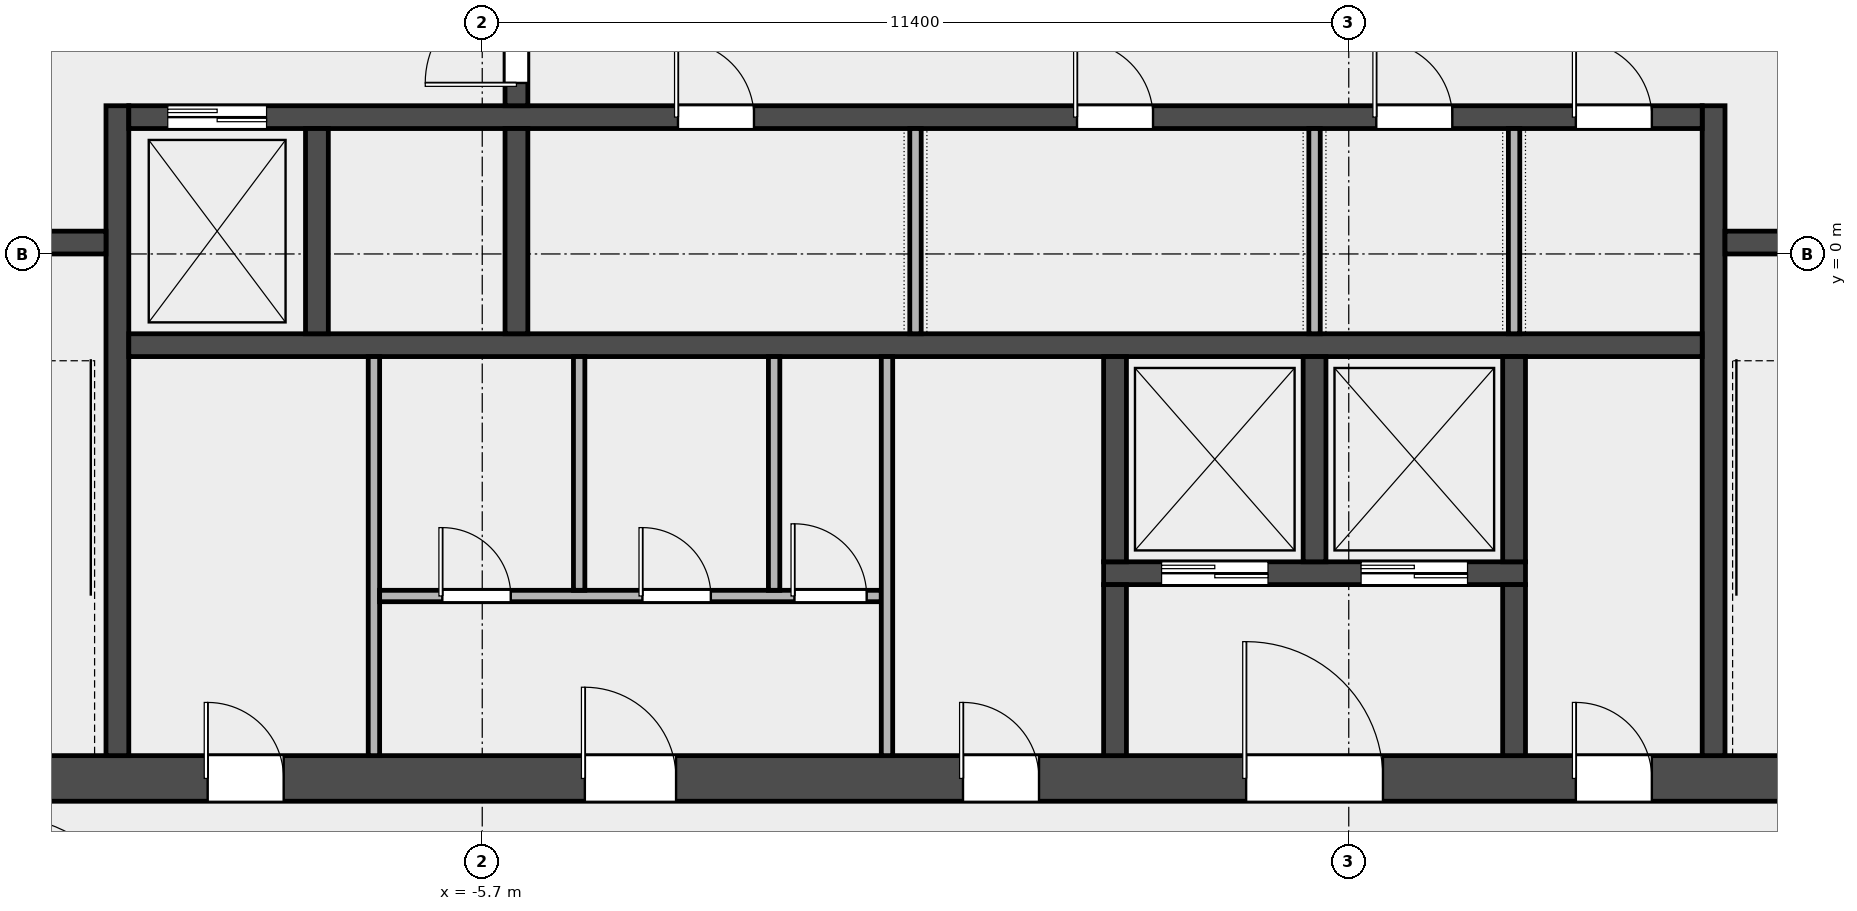
"""IFC4 building model, lengths in metres.
Left out: names, types, materials, properties, quantities, classifications, styles, units other than length and angle.
Written with IfcOpenShell. Run it as: python <this file> out.ifc"""

import sys

from ifc_helpers import new_model, si_unit, direction, frame, frame_2d, origin, place, context, subcontext, project, spatial, rectangle, extrude, element, fill, save


model = new_model("IFC4")
c1 = context("Model", 3, precision=1e-05, world=origin(), true_north=direction((0.0, 1.0)))
c2 = subcontext(c1, "Body", "Model", "MODEL_VIEW")
j1 = project(units=[si_unit("LENGTHUNIT", "METRE"), si_unit("PLANEANGLEUNIT", "RADIAN")], contexts=[c1])
p1 = place(None, origin())
s1 = spatial("IfcSite", under=j1, at=p1, CompositionType="ELEMENT")
p2 = place(p1, origin())
s2 = spatial("IfcBuilding", under=s1, at=p2, CompositionType="ELEMENT")
p3 = place(p2, frame((0.0, 0.0, 215.0)))
s3 = spatial("IfcBuildingStorey", under=s2, at=p3, CompositionType="ELEMENT", Elevation=215.0)
p4 = place(p3, frame((-14.4, -6.9, 0.0), z_axis=(0.0, 0.0, 1.0), x_axis=(1.0, 0.0, 0.0)))
e1 = element("IfcWall", 1, at=p4, inside=s3, PredefinedType="SHEAR", context=c2, shape_type="SweptSolid", body=[
    extrude(rectangle(XDim=28.8, YDim=0.6, at=frame_2d((14.4, 0.0))), origin(), (0.0, 0.0, 1.0), 3.7),
])
p5 = place(p4, frame((5.087, 0.0, 0.0)))
e2 = element("IfcOpeningElement", 2, at=p5, cuts=e1, PredefinedType="OPENING", context=c2, shape_type="SweptSolid", body=[
    extrude(rectangle(XDim=1.0, YDim=2.1, at=frame_2d((0.5, 1.05))), frame((0.0, 0.312, 0.0), z_axis=(0.0, -1.0, 0.0), x_axis=(1.0, 0.0, 0.0)), (0.0, 0.0, 1.0), 0.624),
])
p6 = place(p4, frame((10.05, 0.0, 0.0)))
e3 = element("IfcOpeningElement", 3, at=p6, cuts=e1, PredefinedType="OPENING", context=c2, shape_type="SweptSolid", body=[
    extrude(rectangle(XDim=1.2, YDim=2.1, at=frame_2d((0.6, 1.05))), frame((0.0, 0.312, 0.0), z_axis=(0.0, -1.0, 0.0), x_axis=(1.0, 0.0, 0.0)), (0.0, 0.0, 1.0), 0.624),
])
p7 = place(p4, frame((15.025, 0.0, 0.0)))
e4 = element("IfcOpeningElement", 4, at=p7, cuts=e1, PredefinedType="OPENING", context=c2, shape_type="SweptSolid", body=[
    extrude(rectangle(XDim=1.0, YDim=2.1, at=frame_2d((0.5, 1.05))), frame((0.0, 0.312, 0.0), z_axis=(0.0, -1.0, 0.0), x_axis=(1.0, 0.0, 0.0)), (0.0, 0.0, 1.0), 0.624),
])
p8 = place(p4, frame((18.75, 0.0, 0.0)))
e5 = element("IfcOpeningElement", 5, at=p8, cuts=e1, PredefinedType="OPENING", context=c2, shape_type="SweptSolid", body=[
    extrude(rectangle(XDim=1.8, YDim=2.1, at=frame_2d((0.9, 1.05))), frame((0.0, 0.312, 0.0), z_axis=(0.0, -1.0, 0.0), x_axis=(1.0, 0.0, 0.0)), (0.0, 0.0, 1.0), 0.624),
])
p9 = place(p4, frame((23.087, 0.0, 0.0)))
e6 = element("IfcOpeningElement", 6, at=p9, cuts=e1, PredefinedType="OPENING", context=c2, shape_type="SweptSolid", body=[
    extrude(rectangle(XDim=1.0, YDim=2.1, at=frame_2d((0.5, 1.05))), frame((0.0, 0.312, 0.0), z_axis=(0.0, -1.0, 0.0), x_axis=(1.0, 0.0, 0.0)), (0.0, 0.0, 1.0), 0.624),
])
for number, where, z_axis, x_axis in (
    (7, (-10.5, -6.6, 0.0), (0.0, 0.0, 1.0), (0.0, 1.0, 0.0)),
    (8, (10.5, -6.6, 0.0), (0.0, 0.0, 1.0), (0.0, 1.0, 0.0)),
):
    element("IfcWall", number, at=place(p3, frame(where, z_axis=z_axis, x_axis=x_axis)), inside=s3, PredefinedType="SHEAR", context=c2, shape_type="SweptSolid", body=[
        extrude(rectangle(XDim=8.55, YDim=0.3, at=frame_2d((4.275, 0.0))), origin(), (0.0, 0.0, 1.0), 3.7),
    ])
p10 = place(p3, frame((-13.8, 0.15, 0.0), z_axis=(0.0, 0.0, 1.0), x_axis=(1.0, 0.0, 0.0)))
e9 = element("IfcWall", 9, at=p10, inside=s3, PredefinedType="SOLIDWALL", context=c2, shape_type="SweptSolid", body=[
    extrude(rectangle(XDim=3.15, YDim=0.3, at=frame_2d((1.575, 0.0))), origin(), (0.0, 0.0, 1.0), 3.7),
])
p11 = place(p10, frame((0.975, 0.0, 0.0)))
e10 = element("IfcOpeningElement", 10, at=p11, cuts=e9, PredefinedType="OPENING", context=c2, shape_type="SweptSolid", body=[
    extrude(rectangle(XDim=1.1, YDim=2.1, at=frame_2d((0.55, 1.05))), frame((0.0, 0.162, 0.0), z_axis=(0.0, -1.0, 0.0), x_axis=(1.0, 0.0, 0.0)), (0.0, 0.0, 1.0), 0.324),
])
p12 = place(p3, frame((10.65, 0.15, 0.0), z_axis=(0.0, 0.0, 1.0), x_axis=(1.0, 0.0, 0.0)))
e11 = element("IfcWall", 11, at=p12, inside=s3, PredefinedType="SOLIDWALL", context=c2, shape_type="SweptSolid", body=[
    extrude(rectangle(XDim=3.15, YDim=0.3, at=frame_2d((1.575, 0.0))), origin(), (0.0, 0.0, 1.0), 3.7),
])
p13 = place(p12, frame((1.025, 0.0, 0.0)))
e12 = element("IfcOpeningElement", 12, at=p13, cuts=e11, PredefinedType="OPENING", context=c2, shape_type="SweptSolid", body=[
    extrude(rectangle(XDim=1.1, YDim=2.1, at=frame_2d((0.55, 1.05))), frame((0.0, 0.162, 0.0), z_axis=(0.0, -1.0, 0.0), x_axis=(1.0, 0.0, 0.0)), (0.0, 0.0, 1.0), 0.324),
])
p14 = place(p3, frame((-10.35, -1.2, 0.0), z_axis=(0.0, 0.0, 1.0), x_axis=(1.0, 0.0, 0.0)))
e13 = element("IfcWall", 13, at=p14, inside=s3, PredefinedType="SOLIDWALL", context=c2, shape_type="SweptSolid", body=[
    extrude(rectangle(XDim=20.7, YDim=0.3, at=frame_2d((10.35, 0.0))), origin(), (0.0, 0.0, 1.0), 3.7),
])
p15 = place(p3, frame((-10.35, 1.8, 0.0), z_axis=(0.0, 0.0, 1.0), x_axis=(1.0, 0.0, 0.0)))
e14 = element("IfcWall", 14, at=p15, inside=s3, PredefinedType="SOLIDWALL", context=c2, shape_type="SweptSolid", body=[
    extrude(rectangle(XDim=20.7, YDim=0.3, at=frame_2d((10.35, 0.0))), origin(), (0.0, 0.0, 1.0), 3.7),
])
p16 = place(p15, frame((0.512, 0.0, 0.0)))
e15 = element("IfcOpeningElement", 15, at=p16, cuts=e14, PredefinedType="OPENING", context=c2, shape_type="SweptSolid", body=[
    extrude(rectangle(XDim=1.3, YDim=2.1, at=frame_2d((0.65, 1.05))), frame((0.0, 0.162, 0.0), z_axis=(0.0, -1.0, 0.0), x_axis=(1.0, 0.0, 0.0)), (0.0, 0.0, 1.0), 0.324),
])
p17 = place(p15, frame((7.225, 0.0, 0.0)))
e16 = element("IfcOpeningElement", 16, at=p17, cuts=e14, PredefinedType="OPENING", context=c2, shape_type="SweptSolid", body=[
    extrude(rectangle(XDim=1.0, YDim=2.1, at=frame_2d((0.5, 1.05))), frame((0.0, 0.162, 0.0), z_axis=(0.0, -1.0, 0.0), x_axis=(1.0, 0.0, 0.0)), (0.0, 0.0, 1.0), 0.324),
])
p18 = place(p15, frame((12.475, 0.0, 0.0)))
e17 = element("IfcOpeningElement", 17, at=p18, cuts=e14, PredefinedType="OPENING", context=c2, shape_type="SweptSolid", body=[
    extrude(rectangle(XDim=1.0, YDim=2.1, at=frame_2d((0.5, 1.05))), frame((0.0, 0.162, 0.0), z_axis=(0.0, -1.0, 0.0), x_axis=(1.0, 0.0, 0.0)), (0.0, 0.0, 1.0), 0.324),
])
p19 = place(p15, frame((16.413, 0.0, 0.0)))
e18 = element("IfcOpeningElement", 18, at=p19, cuts=e14, PredefinedType="OPENING", context=c2, shape_type="SweptSolid", body=[
    extrude(rectangle(XDim=1.0, YDim=2.1, at=frame_2d((0.5, 1.05))), frame((0.0, 0.162, 0.0), z_axis=(0.0, -1.0, 0.0), x_axis=(1.0, 0.0, 0.0)), (0.0, 0.0, 1.0), 0.324),
])
p20 = place(p15, frame((19.038, 0.0, 0.0)))
e19 = element("IfcOpeningElement", 19, at=p20, cuts=e14, PredefinedType="OPENING", context=c2, shape_type="SweptSolid", body=[
    extrude(rectangle(XDim=1.0, YDim=2.1, at=frame_2d((0.5, 1.05))), frame((0.0, 0.162, 0.0), z_axis=(0.0, -1.0, 0.0), x_axis=(1.0, 0.0, 0.0)), (0.0, 0.0, 1.0), 0.324),
])
for number, where, z_axis, x_axis in (
    (20, (-7.875, -1.05, 0.0), (0.0, 0.0, 1.0), (0.0, 1.0, 0.0)),
    (21, (-5.25, -1.05, 0.0), (0.0, 0.0, 1.0), (0.0, 1.0, 0.0)),
):
    element("IfcWall", number, at=place(p3, frame(where, z_axis=z_axis, x_axis=x_axis)), inside=s3, PredefinedType="SOLIDWALL", context=c2, shape_type="SweptSolid", body=[
        extrude(rectangle(XDim=2.7, YDim=0.3, at=frame_2d((1.35, 0.0))), origin(), (0.0, 0.0, 1.0), 3.7),
    ])
p21 = place(p3, frame((-5.25, 1.95, 0.0), z_axis=(0.0, 0.0, 1.0), x_axis=(0.0, 1.0, 0.0)))
e22 = element("IfcWall", 22, at=p21, inside=s3, PredefinedType="SOLIDWALL", context=c2, shape_type="SweptSolid", body=[
    extrude(rectangle(XDim=3.3, YDim=0.3, at=frame_2d((1.65, 0.0))), origin(), (0.0, 0.0, 1.0), 3.7),
])
p22 = place(p21, frame((0.3, 0.0, 0.0)))
e23 = element("IfcOpeningElement", 23, at=p22, cuts=e22, PredefinedType="OPENING", context=c2, shape_type="SweptSolid", body=[
    extrude(rectangle(XDim=1.2, YDim=2.1, at=frame_2d((0.6, 1.05))), frame((0.0, 0.162, 0.0), z_axis=(0.0, -1.0, 0.0), x_axis=(1.0, 0.0, 0.0)), (0.0, 0.0, 1.0), 0.324),
])
p23 = place(p21, frame((1.8, 0.0, 0.0)))
e24 = element("IfcOpeningElement", 24, at=p23, cuts=e22, PredefinedType="OPENING", context=c2, shape_type="SweptSolid", body=[
    extrude(rectangle(XDim=1.2, YDim=2.1, at=frame_2d((0.6, 1.05))), frame((0.0, 0.162, 0.0), z_axis=(0.0, -1.0, 0.0), x_axis=(1.0, 0.0, 0.0)), (0.0, 0.0, 1.0), 0.324),
])
p24 = place(p3, frame((2.475, -4.2, 0.0), z_axis=(0.0, 0.0, 1.0), x_axis=(1.0, 0.0, 0.0)))
e25 = element("IfcWall", 25, at=p24, inside=s3, PredefinedType="SOLIDWALL", context=c2, shape_type="SweptSolid", body=[
    extrude(rectangle(XDim=5.55, YDim=0.3, at=frame_2d((2.775, 0.0))), origin(), (0.0, 0.0, 1.0), 3.7),
])
p25 = place(p24, frame((0.762, 0.0, 0.0)))
e26 = element("IfcOpeningElement", 26, at=p25, cuts=e25, PredefinedType="OPENING", context=c2, shape_type="SweptSolid", body=[
    extrude(rectangle(XDim=1.4, YDim=2.1, at=frame_2d((0.7, 1.05))), frame((0.0, 0.162, 0.0), z_axis=(0.0, -1.0, 0.0), x_axis=(1.0, 0.0, 0.0)), (0.0, 0.0, 1.0), 0.324),
])
p26 = place(p24, frame((3.387, 0.0, 0.0)))
e27 = element("IfcOpeningElement", 27, at=p26, cuts=e25, PredefinedType="OPENING", context=c2, shape_type="SweptSolid", body=[
    extrude(rectangle(XDim=1.4, YDim=2.1, at=frame_2d((0.7, 1.05))), frame((0.0, 0.162, 0.0), z_axis=(0.0, -1.0, 0.0), x_axis=(1.0, 0.0, 0.0)), (0.0, 0.0, 1.0), 0.324),
])
p27 = place(p3, frame((2.625, -4.05, 0.0), z_axis=(0.0, 0.0, 1.0), x_axis=(0.0, 1.0, 0.0)))
e28 = element("IfcWall", 28, at=p27, inside=s3, PredefinedType="SOLIDWALL", context=c2, shape_type="SweptSolid", body=[
    extrude(rectangle(XDim=2.7, YDim=0.3, at=frame_2d((1.35, 0.0))), origin(), (0.0, 0.0, 1.0), 3.7),
])
p28 = place(p3, frame((2.625, -6.6, 0.0), z_axis=(0.0, 0.0, 1.0), x_axis=(0.0, 1.0, 0.0)))
e29 = element("IfcWall", 29, at=p28, inside=s3, PredefinedType="SOLIDWALL", context=c2, shape_type="SweptSolid", body=[
    extrude(rectangle(XDim=2.25, YDim=0.3, at=frame_2d((1.125, 0.0))), origin(), (0.0, 0.0, 1.0), 3.7),
])
for number, where, z_axis, x_axis in (
    (30, (5.25, -4.05, 0.0), (0.0, 0.0, 1.0), (0.0, 1.0, 0.0)),
    (31, (7.875, -4.05, 0.0), (0.0, 0.0, 1.0), (0.0, 1.0, 0.0)),
):
    element("IfcWall", number, at=place(p3, frame(where, z_axis=z_axis, x_axis=x_axis)), inside=s3, PredefinedType="SOLIDWALL", context=c2, shape_type="SweptSolid", body=[
        extrude(rectangle(XDim=2.7, YDim=0.3, at=frame_2d((1.35, 0.0))), origin(), (0.0, 0.0, 1.0), 3.7),
    ])
p29 = place(p3, frame((7.875, -6.6, 0.0), z_axis=(0.0, 0.0, 1.0), x_axis=(0.0, 1.0, 0.0)))
e32 = element("IfcWall", 32, at=p29, inside=s3, PredefinedType="SOLIDWALL", context=c2, shape_type="SweptSolid", body=[
    extrude(rectangle(XDim=2.25, YDim=0.3, at=frame_2d((1.125, 0.0))), origin(), (0.0, 0.0, 1.0), 3.7),
])
p30 = place(p3, frame((-7.125, -6.6, 0.0), z_axis=(0.0, 0.0, 1.0), x_axis=(0.0, 1.0, 0.0)))
e33 = element("IfcWall", 33, at=p30, inside=s3, PredefinedType="PARTITIONING", context=c2, shape_type="SweptSolid", body=[
    extrude(rectangle(XDim=5.25, YDim=0.15, at=frame_2d((2.625, 0.0))), origin(), (0.0, 0.0, 1.0), 3.7),
])
p31 = place(p3, frame((-7.05, -4.5, 0.0), z_axis=(0.0, 0.0, 1.0), x_axis=(1.0, 0.0, 0.0)))
e34 = element("IfcWall", 34, at=p31, inside=s3, PredefinedType="PARTITIONING", context=c2, shape_type="SweptSolid", body=[
    extrude(rectangle(XDim=6.6, YDim=0.15, at=frame_2d((3.3, 0.0))), origin(), (0.0, 0.0, 1.0), 3.7),
])
p32 = place(p31, frame((0.825, 0.0, 0.0)))
e35 = element("IfcOpeningElement", 35, at=p32, cuts=e34, PredefinedType="OPENING", context=c2, shape_type="SweptSolid", body=[
    extrude(rectangle(XDim=0.9, YDim=2.1, at=frame_2d((0.45, 1.05))), frame((0.0, 0.087, 0.0), z_axis=(0.0, -1.0, 0.0), x_axis=(1.0, 0.0, 0.0)), (0.0, 0.0, 1.0), 0.174),
])
p33 = place(p31, frame((3.458, 0.0, 0.0)))
e36 = element("IfcOpeningElement", 36, at=p33, cuts=e34, PredefinedType="OPENING", context=c2, shape_type="SweptSolid", body=[
    extrude(rectangle(XDim=0.9, YDim=2.1, at=frame_2d((0.45, 1.05))), frame((0.0, 0.087, 0.0), z_axis=(0.0, -1.0, 0.0), x_axis=(1.0, 0.0, 0.0)), (0.0, 0.0, 1.0), 0.174),
])
p34 = place(p31, frame((5.458, 0.0, 0.0)))
e37 = element("IfcOpeningElement", 37, at=p34, cuts=e34, PredefinedType="OPENING", context=c2, shape_type="SweptSolid", body=[
    extrude(rectangle(XDim=0.95, YDim=2.1, at=frame_2d((0.475, 1.05))), frame((0.0, 0.087, 0.0), z_axis=(0.0, -1.0, 0.0), x_axis=(1.0, 0.0, 0.0)), (0.0, 0.0, 1.0), 0.174),
])
for number, where, z_axis, x_axis in (
    (38, (-4.425, -4.425, 0.0), (0.0, 0.0, 1.0), (0.0, 1.0, 0.0)),
    (39, (-1.86, -4.425, 0.0), (0.0, 0.0, 1.0), (0.0, 1.0, 0.0)),
):
    element("IfcWall", number, at=place(p3, frame(where, z_axis=z_axis, x_axis=x_axis)), inside=s3, PredefinedType="PARTITIONING", context=c2, shape_type="SweptSolid", body=[
        extrude(rectangle(XDim=3.075, YDim=0.15, at=frame_2d((1.538, 0.0))), origin(), (0.0, 0.0, 1.0), 3.7),
    ])
p35 = place(p3, frame((-0.375, -6.6, 0.0), z_axis=(0.0, 0.0, 1.0), x_axis=(0.0, 1.0, 0.0)))
e40 = element("IfcWall", 40, at=p35, inside=s3, PredefinedType="PARTITIONING", context=c2, shape_type="SweptSolid", body=[
    extrude(rectangle(XDim=5.25, YDim=0.15, at=frame_2d((2.625, 0.0))), origin(), (0.0, 0.0, 1.0), 3.7),
])
for number, where, z_axis, x_axis in (
    (41, (0.0, -1.05, 0.0), (0.0, 0.0, 1.0), (0.0, 1.0, 0.0)),
    (42, (5.25, -1.05, 0.0), (0.0, 0.0, 1.0), (0.0, 1.0, 0.0)),
    (43, (7.875, -1.05, 0.0), (0.0, 0.0, 1.0), (0.0, 1.0, 0.0)),
):
    element("IfcWall", number, at=place(p3, frame(where, z_axis=z_axis, x_axis=x_axis)), inside=s3, PredefinedType="PARTITIONING", context=c2, shape_type="SweptSolid", body=[
        extrude(rectangle(XDim=2.7, YDim=0.15, at=frame_2d((1.35, 0.0))), origin(), (0.0, 0.0, 1.0), 3.7),
    ])
p36 = place(p22, origin())
e44 = element("IfcDoor", 44, at=p36, inside=s3, OperationType="SINGLE_SWING_LEFT", PredefinedType="DOOR", context=c2, shape_type="SweptSolid", body=[
    extrude(rectangle(XDim=1.2, YDim=2.1, at=frame_2d((0.6, 1.05))), frame((0.0, 0.025, 0.0), z_axis=(0.0, -1.0, 0.0), x_axis=(1.0, 0.0, 0.0)), (0.0, 0.0, 1.0), 0.05),
])
fill(e23, e44)
p37 = place(p16, origin())
e45 = element("IfcDoor", 45, at=p37, inside=s3, OperationType="DOUBLE_DOOR_SLIDING", PredefinedType="DOOR", context=c2, shape_type="SweptSolid", body=[
    extrude(rectangle(XDim=1.3, YDim=2.1, at=frame_2d((0.65, 1.05))), frame((0.0, 0.025, 0.0), z_axis=(0.0, -1.0, 0.0), x_axis=(1.0, 0.0, 0.0)), (0.0, 0.0, 1.0), 0.05),
])
fill(e15, e45)
p38 = place(p25, origin())
e46 = element("IfcDoor", 46, at=p38, inside=s3, OperationType="DOUBLE_DOOR_SLIDING", PredefinedType="DOOR", context=c2, shape_type="SweptSolid", body=[
    extrude(rectangle(XDim=1.4, YDim=2.1, at=frame_2d((0.7, 1.05))), frame((0.0, 0.025, 0.0), z_axis=(0.0, -1.0, 0.0), x_axis=(1.0, 0.0, 0.0)), (0.0, 0.0, 1.0), 0.05),
])
fill(e26, e46)
p39 = place(p26, origin())
e47 = element("IfcDoor", 47, at=p39, inside=s3, OperationType="DOUBLE_DOOR_SLIDING", PredefinedType="DOOR", context=c2, shape_type="SweptSolid", body=[
    extrude(rectangle(XDim=1.4, YDim=2.1, at=frame_2d((0.7, 1.05))), frame((0.0, 0.025, 0.0), z_axis=(0.0, -1.0, 0.0), x_axis=(1.0, 0.0, 0.0)), (0.0, 0.0, 1.0), 0.05),
])
fill(e27, e47)
p40 = place(p5, origin())
e48 = element("IfcDoor", 48, at=p40, inside=s3, OperationType="SINGLE_SWING_LEFT", PredefinedType="DOOR", context=c2, shape_type="SweptSolid", body=[
    extrude(rectangle(XDim=1.0, YDim=2.1, at=frame_2d((0.5, 1.05))), frame((0.0, 0.025, 0.0), z_axis=(0.0, -1.0, 0.0), x_axis=(1.0, 0.0, 0.0)), (0.0, 0.0, 1.0), 0.05),
])
fill(e2, e48)
p41 = place(p6, origin())
e49 = element("IfcDoor", 49, at=p41, inside=s3, OperationType="SINGLE_SWING_LEFT", PredefinedType="DOOR", context=c2, shape_type="SweptSolid", body=[
    extrude(rectangle(XDim=1.2, YDim=2.1, at=frame_2d((0.6, 1.05))), frame((0.0, 0.025, 0.0), z_axis=(0.0, -1.0, 0.0), x_axis=(1.0, 0.0, 0.0)), (0.0, 0.0, 1.0), 0.05),
])
fill(e3, e49)
p42 = place(p32, origin())
e50 = element("IfcDoor", 50, at=p42, inside=s3, OperationType="SINGLE_SWING_LEFT", PredefinedType="DOOR", context=c2, shape_type="SweptSolid", body=[
    extrude(rectangle(XDim=0.9, YDim=2.1, at=frame_2d((0.45, 1.05))), frame((0.0, 0.025, 0.0), z_axis=(0.0, -1.0, 0.0), x_axis=(1.0, 0.0, 0.0)), (0.0, 0.0, 1.0), 0.05),
])
fill(e35, e50)
p43 = place(p33, origin())
e51 = element("IfcDoor", 51, at=p43, inside=s3, OperationType="SINGLE_SWING_LEFT", PredefinedType="DOOR", context=c2, shape_type="SweptSolid", body=[
    extrude(rectangle(XDim=0.9, YDim=2.1, at=frame_2d((0.45, 1.05))), frame((0.0, 0.025, 0.0), z_axis=(0.0, -1.0, 0.0), x_axis=(1.0, 0.0, 0.0)), (0.0, 0.0, 1.0), 0.05),
])
fill(e36, e51)
p44 = place(p34, origin())
e52 = element("IfcDoor", 52, at=p44, inside=s3, OperationType="SINGLE_SWING_LEFT", PredefinedType="DOOR", context=c2, shape_type="SweptSolid", body=[
    extrude(rectangle(XDim=0.95, YDim=2.1, at=frame_2d((0.475, 1.05))), frame((0.0, 0.025, 0.0), z_axis=(0.0, -1.0, 0.0), x_axis=(1.0, 0.0, 0.0)), (0.0, 0.0, 1.0), 0.05),
])
fill(e37, e52)
p45 = place(p7, origin())
e53 = element("IfcDoor", 53, at=p45, inside=s3, OperationType="SINGLE_SWING_LEFT", PredefinedType="DOOR", context=c2, shape_type="SweptSolid", body=[
    extrude(rectangle(XDim=1.0, YDim=2.1, at=frame_2d((0.5, 1.05))), frame((0.0, 0.025, 0.0), z_axis=(0.0, -1.0, 0.0), x_axis=(1.0, 0.0, 0.0)), (0.0, 0.0, 1.0), 0.05),
])
fill(e4, e53)
p46 = place(p8, origin())
e54 = element("IfcDoor", 54, at=p46, inside=s3, OperationType="DOUBLE_DOOR_SINGLE_SWING", PredefinedType="DOOR", context=c2, shape_type="SweptSolid", body=[
    extrude(rectangle(XDim=1.8, YDim=2.1, at=frame_2d((0.9, 1.05))), frame((0.0, 0.025, 0.0), z_axis=(0.0, -1.0, 0.0), x_axis=(1.0, 0.0, 0.0)), (0.0, 0.0, 1.0), 0.05),
])
fill(e5, e54)
p47 = place(p9, origin())
e55 = element("IfcDoor", 55, at=p47, inside=s3, OperationType="SINGLE_SWING_LEFT", PredefinedType="DOOR", context=c2, shape_type="SweptSolid", body=[
    extrude(rectangle(XDim=1.0, YDim=2.1, at=frame_2d((0.5, 1.05))), frame((0.0, 0.025, 0.0), z_axis=(0.0, -1.0, 0.0), x_axis=(1.0, 0.0, 0.0)), (0.0, 0.0, 1.0), 0.05),
])
fill(e6, e55)
p48 = place(p17, origin())
e56 = element("IfcDoor", 56, at=p48, inside=s3, OperationType="SINGLE_SWING_LEFT", PredefinedType="DOOR", context=c2, shape_type="SweptSolid", body=[
    extrude(rectangle(XDim=1.0, YDim=2.1, at=frame_2d((0.5, 1.05))), frame((0.0, 0.025, 0.0), z_axis=(0.0, -1.0, 0.0), x_axis=(1.0, 0.0, 0.0)), (0.0, 0.0, 1.0), 0.05),
])
fill(e16, e56)
p49 = place(p18, origin())
e57 = element("IfcDoor", 57, at=p49, inside=s3, OperationType="SINGLE_SWING_LEFT", PredefinedType="DOOR", context=c2, shape_type="SweptSolid", body=[
    extrude(rectangle(XDim=1.0, YDim=2.1, at=frame_2d((0.5, 1.05))), frame((0.0, 0.025, 0.0), z_axis=(0.0, -1.0, 0.0), x_axis=(1.0, 0.0, 0.0)), (0.0, 0.0, 1.0), 0.05),
])
fill(e17, e57)
p50 = place(p19, origin())
e58 = element("IfcDoor", 58, at=p50, inside=s3, OperationType="SINGLE_SWING_LEFT", PredefinedType="DOOR", context=c2, shape_type="SweptSolid", body=[
    extrude(rectangle(XDim=1.0, YDim=2.1, at=frame_2d((0.5, 1.05))), frame((0.0, 0.025, 0.0), z_axis=(0.0, -1.0, 0.0), x_axis=(1.0, 0.0, 0.0)), (0.0, 0.0, 1.0), 0.05),
])
fill(e18, e58)
p51 = place(p20, origin())
e59 = element("IfcDoor", 59, at=p51, inside=s3, OperationType="SINGLE_SWING_LEFT", PredefinedType="DOOR", context=c2, shape_type="SweptSolid", body=[
    extrude(rectangle(XDim=1.0, YDim=2.1, at=frame_2d((0.5, 1.05))), frame((0.0, 0.025, 0.0), z_axis=(0.0, -1.0, 0.0), x_axis=(1.0, 0.0, 0.0)), (0.0, 0.0, 1.0), 0.05),
])
fill(e19, e59)
save(model, sys.argv[1])
